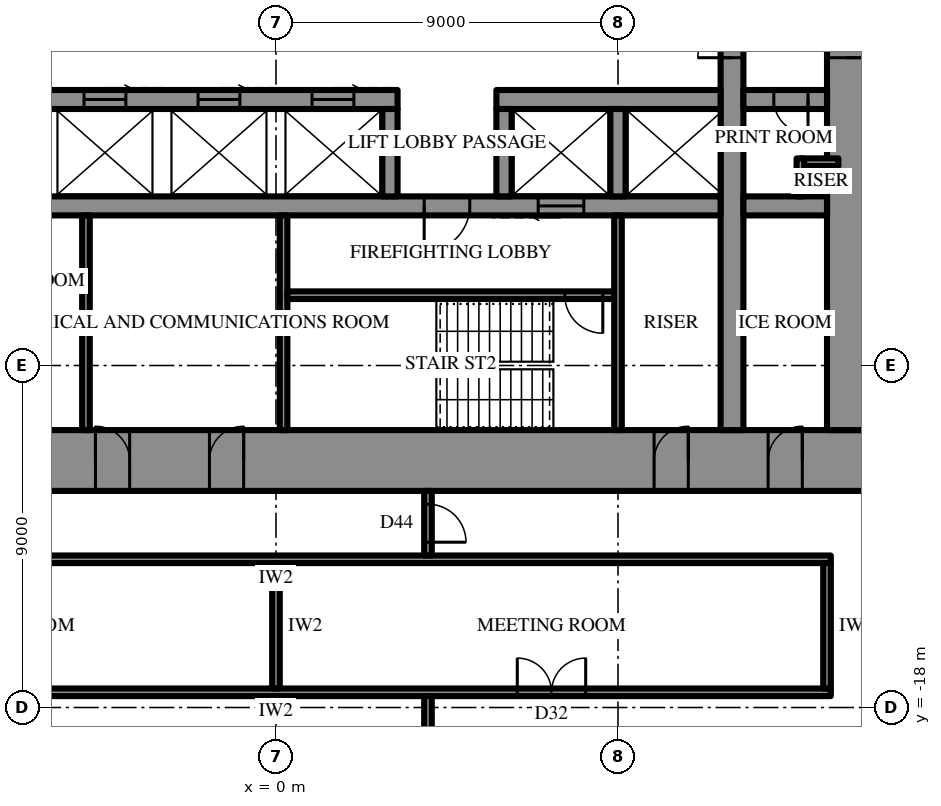
"""IFC4 building model, lengths in metres.
Left out: names, types, materials, properties, quantities, classifications, styles, units other than length and angle.
Written with IfcOpenShell. Run it as: python <this file> out.ifc"""

import sys

from ifc_helpers import new_model, si_unit, direction, frame, frame_2d, origin, place, context, subcontext, project, spatial, rectangle, extrude, element, fill, save


model = new_model("IFC4")
c1 = context("Model", 3, precision=1e-05, world=origin(), true_north=direction((0.0, 1.0)))
c2 = subcontext(c1, "Body", "Model", "MODEL_VIEW")
j1 = project(units=[si_unit("LENGTHUNIT", "METRE"), si_unit("PLANEANGLEUNIT", "RADIAN")], contexts=[c1])
p1 = place(None, origin())
s1 = spatial("IfcSite", under=j1, at=p1, CompositionType="ELEMENT")
p2 = place(p1, origin())
s2 = spatial("IfcBuilding", under=s1, at=p2, CompositionType="ELEMENT")
p3 = place(p2, frame((0.0, 0.0, 286.9)))
s3 = spatial("IfcBuildingStorey", under=s2, at=p3, CompositionType="ELEMENT", Elevation=286.9)
p4 = place(p3, frame((15.5, -11.5, 0.0), z_axis=(0.0, 0.0, 1.0), x_axis=(-1.0, 0.0, 0.0)))
e1 = element("IfcWall", 1, at=p4, inside=s3, PredefinedType="SHEAR", context=c2, shape_type="SweptSolid", body=[
    extrude(rectangle(XDim=31.0, YDim=1.6, at=frame_2d((15.5, 0.0))), origin(), (0.0, 0.0, 1.0), 4.2),
])
p5 = place(p4, frame((16.35, 0.0, 0.0)))
e2 = element("IfcOpeningElement", 2, at=p5, cuts=e1, PredefinedType="OPENING", context=c2, shape_type="SweptSolid", body=[
    extrude(rectangle(XDim=0.9, YDim=2.2, at=frame_2d((0.45, 1.1))), frame((0.0, 0.81, 0.0), z_axis=(0.0, -1.0, 0.0), x_axis=(1.0, 0.0, 0.0)), (0.0, 0.0, 1.0), 1.62),
])
p6 = place(p4, frame((19.35, 0.0, 0.0)))
e3 = element("IfcOpeningElement", 3, at=p6, cuts=e1, PredefinedType="OPENING", context=c2, shape_type="SweptSolid", body=[
    extrude(rectangle(XDim=0.9, YDim=2.2, at=frame_2d((0.45, 1.1))), frame((0.0, 0.81, 0.0), z_axis=(0.0, -1.0, 0.0), x_axis=(1.0, 0.0, 0.0)), (0.0, 0.0, 1.0), 1.62),
])
p7 = place(p4, frame((22.4, 0.0, 0.0)))
e4 = element("IfcOpeningElement", 4, at=p7, cuts=e1, PredefinedType="OPENING", context=c2, shape_type="SweptSolid", body=[
    extrude(rectangle(XDim=1.0, YDim=2.2, at=frame_2d((0.5, 1.1))), frame((0.0, 0.81, 0.0), z_axis=(0.0, -1.0, 0.0), x_axis=(1.0, 0.0, 0.0)), (0.0, 0.0, 1.0), 1.62),
])
p8 = place(p4, frame((1.65, 0.0, 0.0)))
e5 = element("IfcOpeningElement", 5, at=p8, cuts=e1, PredefinedType="OPENING", context=c2, shape_type="SweptSolid", body=[
    extrude(rectangle(XDim=0.9, YDim=2.2, at=frame_2d((0.45, 1.1))), frame((0.0, 0.81, 0.0), z_axis=(0.0, -1.0, 0.0), x_axis=(1.0, 0.0, 0.0)), (0.0, 0.0, 1.0), 1.62),
])
p9 = place(p4, frame((4.65, 0.0, 0.0)))
e6 = element("IfcOpeningElement", 6, at=p9, cuts=e1, PredefinedType="OPENING", context=c2, shape_type="SweptSolid", body=[
    extrude(rectangle(XDim=0.9, YDim=2.2, at=frame_2d((0.45, 1.1))), frame((0.0, 0.81, 0.0), z_axis=(0.0, -1.0, 0.0), x_axis=(1.0, 0.0, 0.0)), (0.0, 0.0, 1.0), 1.62),
])
p10 = place(p4, frame((25.45, 0.0, 0.0)))
e7 = element("IfcOpeningElement", 7, at=p10, cuts=e1, PredefinedType="OPENING", context=c2, shape_type="SweptSolid", body=[
    extrude(rectangle(XDim=0.9, YDim=2.2, at=frame_2d((0.45, 1.1))), frame((0.0, 0.81, 0.0), z_axis=(0.0, -1.0, 0.0), x_axis=(1.0, 0.0, 0.0)), (0.0, 0.0, 1.0), 1.62),
])
p11 = place(p4, frame((28.45, 0.0, 0.0)))
e8 = element("IfcOpeningElement", 8, at=p11, cuts=e1, PredefinedType="OPENING", context=c2, shape_type="SweptSolid", body=[
    extrude(rectangle(XDim=0.9, YDim=2.2, at=frame_2d((0.45, 1.1))), frame((0.0, 0.81, 0.0), z_axis=(0.0, -1.0, 0.0), x_axis=(1.0, 0.0, 0.0)), (0.0, 0.0, 1.0), 1.62),
])
p12 = place(p3, frame((15.0, -10.7, 0.0), z_axis=(0.0, 0.0, 1.0), x_axis=(0.0, 1.0, 0.0)))
e9 = element("IfcWall", 9, at=p12, inside=s3, PredefinedType="SHEAR", context=c2, shape_type="SweptSolid", body=[
    extrude(rectangle(XDim=21.4, YDim=1.0, at=frame_2d((10.7, 0.0))), origin(), (0.0, 0.0, 1.0), 4.2),
])
p13 = place(p12, frame((9.8, 0.0, 0.0)))
e10 = element("IfcOpeningElement", 10, at=p13, cuts=e9, PredefinedType="OPENING", context=c2, shape_type="SweptSolid", body=[
    extrude(rectangle(XDim=1.8, YDim=2.4, at=frame_2d((0.9, 1.2))), frame((0.0, 0.51, 0.0), z_axis=(0.0, -1.0, 0.0), x_axis=(1.0, 0.0, 0.0)), (0.0, 0.0, 1.0), 1.02),
])
p14 = place(p3, frame((12.0, -10.7, 0.0), z_axis=(0.0, 0.0, 1.0), x_axis=(0.0, 1.0, 0.0)))
e11 = element("IfcWall", 11, at=p14, inside=s3, PredefinedType="SHEAR", context=c2, shape_type="SweptSolid", body=[
    extrude(rectangle(XDim=21.4, YDim=0.6, at=frame_2d((10.7, 0.0))), origin(), (0.0, 0.0, 1.0), 4.2),
])
p15 = place(p14, frame((9.8, 0.0, 0.0)))
e12 = element("IfcOpeningElement", 12, at=p15, cuts=e11, PredefinedType="OPENING", context=c2, shape_type="SweptSolid", body=[
    extrude(rectangle(XDim=1.8, YDim=2.4, at=frame_2d((0.9, 1.2))), frame((0.0, 0.31, 0.0), z_axis=(0.0, -1.0, 0.0), x_axis=(1.0, 0.0, 0.0)), (0.0, 0.0, 1.0), 0.62),
])
p16 = place(p3, frame((14.5, -2.0, 0.0), z_axis=(0.0, 0.0, 1.0), x_axis=(-1.0, 0.0, 0.0)))
e13 = element("IfcWall", 13, at=p16, inside=s3, PredefinedType="SHEAR", context=c2, shape_type="SweptSolid", body=[
    extrude(rectangle(XDim=2.2, YDim=0.5, at=frame_2d((1.1, 0.0))), origin(), (0.0, 0.0, 1.0), 4.2),
])
p17 = place(p16, frame((0.5, 0.0, 0.0)))
e14 = element("IfcOpeningElement", 14, at=p17, cuts=e13, PredefinedType="OPENING", context=c2, shape_type="SweptSolid", body=[
    extrude(rectangle(XDim=0.9, YDim=2.2, at=frame_2d((0.45, 1.1))), frame((0.0, 0.26, 0.0), z_axis=(0.0, -1.0, 0.0), x_axis=(1.0, 0.0, 0.0)), (0.0, 0.0, 1.0), 0.52),
])
p18 = place(p3, frame((11.7, -2.0, 0.0), z_axis=(0.0, 0.0, 1.0), x_axis=(-1.0, 0.0, 0.0)))
e15 = element("IfcWall", 15, at=p18, inside=s3, PredefinedType="SHEAR", context=c2, shape_type="SweptSolid", body=[
    extrude(rectangle(XDim=5.9, YDim=0.5, at=frame_2d((2.95, 0.0))), origin(), (0.0, 0.0, 1.0), 4.2),
])
p19 = place(p3, frame((3.2, -2.0, 0.0), z_axis=(0.0, 0.0, 1.0), x_axis=(-1.0, 0.0, 0.0)))
e16 = element("IfcWall", 16, at=p19, inside=s3, PredefinedType="SHEAR", context=c2, shape_type="SweptSolid", body=[
    extrude(rectangle(XDim=14.9, YDim=0.5, at=frame_2d((7.45, 0.0))), origin(), (0.0, 0.0, 1.0), 4.2),
])
p20 = place(p19, frame((1.15, 0.0, 0.0)))
e17 = element("IfcOpeningElement", 17, at=p20, cuts=e16, PredefinedType="OPENING", context=c2, shape_type="SweptSolid", body=[
    extrude(rectangle(XDim=1.1, YDim=2.2, at=frame_2d((0.55, 1.1))), frame((0.0, 0.26, 0.0), z_axis=(0.0, -1.0, 0.0), x_axis=(1.0, 0.0, 0.0)), (0.0, 0.0, 1.0), 0.52),
])
p21 = place(p19, frame((4.15, 0.0, 0.0)))
e18 = element("IfcOpeningElement", 18, at=p21, cuts=e16, PredefinedType="OPENING", context=c2, shape_type="SweptSolid", body=[
    extrude(rectangle(XDim=1.1, YDim=2.2, at=frame_2d((0.55, 1.1))), frame((0.0, 0.26, 0.0), z_axis=(0.0, -1.0, 0.0), x_axis=(1.0, 0.0, 0.0)), (0.0, 0.0, 1.0), 0.52),
])
p22 = place(p19, frame((7.15, 0.0, 0.0)))
e19 = element("IfcOpeningElement", 19, at=p22, cuts=e16, PredefinedType="OPENING", context=c2, shape_type="SweptSolid", body=[
    extrude(rectangle(XDim=1.1, YDim=2.2, at=frame_2d((0.55, 1.1))), frame((0.0, 0.26, 0.0), z_axis=(0.0, -1.0, 0.0), x_axis=(1.0, 0.0, 0.0)), (0.0, 0.0, 1.0), 0.52),
])
p23 = place(p19, frame((10.15, 0.0, 0.0)))
e20 = element("IfcOpeningElement", 20, at=p23, cuts=e16, PredefinedType="OPENING", context=c2, shape_type="SweptSolid", body=[
    extrude(rectangle(XDim=1.1, YDim=2.2, at=frame_2d((0.55, 1.1))), frame((0.0, 0.26, 0.0), z_axis=(0.0, -1.0, 0.0), x_axis=(1.0, 0.0, 0.0)), (0.0, 0.0, 1.0), 0.52),
])
p24 = place(p3, frame((14.5, -4.8, 0.0), z_axis=(0.0, 0.0, 1.0), x_axis=(-1.0, 0.0, 0.0)))
e21 = element("IfcWall", 21, at=p24, inside=s3, PredefinedType="SHEAR", context=c2, shape_type="SweptSolid", body=[
    extrude(rectangle(XDim=2.2, YDim=0.5, at=frame_2d((1.1, 0.0))), origin(), (0.0, 0.0, 1.0), 4.2),
])
p25 = place(p3, frame((11.7, -4.8, 0.0), z_axis=(0.0, 0.0, 1.0), x_axis=(-1.0, 0.0, 0.0)))
e22 = element("IfcWall", 22, at=p25, inside=s3, PredefinedType="SHEAR", context=c2, shape_type="SweptSolid", body=[
    extrude(rectangle(XDim=23.4, YDim=0.5, at=frame_2d((11.7, 0.0))), origin(), (0.0, 0.0, 1.0), 4.2),
])
p26 = place(p25, frame((6.6, 0.0, 0.0)))
e23 = element("IfcOpeningElement", 23, at=p26, cuts=e22, PredefinedType="OPENING", context=c2, shape_type="SweptSolid", body=[
    extrude(rectangle(XDim=1.2, YDim=2.2, at=frame_2d((0.6, 1.1))), frame((0.0, 0.26, 0.0), z_axis=(0.0, -1.0, 0.0), x_axis=(1.0, 0.0, 0.0)), (0.0, 0.0, 1.0), 0.52),
])
p27 = place(p25, frame((3.6, 0.0, 0.0)))
e24 = element("IfcOpeningElement", 24, at=p27, cuts=e22, PredefinedType="OPENING", context=c2, shape_type="SweptSolid", body=[
    extrude(rectangle(XDim=1.2, YDim=2.2, at=frame_2d((0.6, 1.1))), frame((0.0, 0.26, 0.0), z_axis=(0.0, -1.0, 0.0), x_axis=(1.0, 0.0, 0.0)), (0.0, 0.0, 1.0), 0.52),
])
for number, where, z_axis, x_axis in (
    (25, (9.0, -2.25, 0.0), (0.0, 0.0, 1.0), (0.0, -1.0, 0.0)),
    (26, (6.0, -2.25, 0.0), (0.0, 0.0, 1.0), (0.0, -1.0, 0.0)),
    (27, (3.0, -2.25, 0.0), (0.0, 0.0, 1.0), (0.0, -1.0, 0.0)),
):
    element("IfcWall", number, at=place(p3, frame(where, z_axis=z_axis, x_axis=x_axis)), inside=s3, PredefinedType="SHEAR", context=c2, shape_type="SweptSolid", body=[
        extrude(rectangle(XDim=2.3, YDim=0.4, at=frame_2d((1.15, 0.0))), origin(), (0.0, 0.0, 1.0), 4.2),
    ])
p28 = place(p3, frame((0.2, -5.05, 0.0), z_axis=(0.0, 0.0, 1.0), x_axis=(0.0, -1.0, 0.0)))
e28 = element("IfcWall", 28, at=p28, inside=s3, PredefinedType="SHEAR", context=c2, shape_type="SweptSolid", body=[
    extrude(rectangle(XDim=5.65, YDim=0.2, at=frame_2d((2.825, 0.0))), origin(), (0.0, 0.0, 1.0), 4.2),
])
p29 = place(p3, frame((8.9, -7.15, 0.0), z_axis=(0.0, 0.0, 1.0), x_axis=(-1.0, 0.0, 0.0)))
e29 = element("IfcWall", 29, at=p29, inside=s3, PredefinedType="SHEAR", context=c2, shape_type="SweptSolid", body=[
    extrude(rectangle(XDim=8.6, YDim=0.2, at=frame_2d((4.3, 0.0))), origin(), (0.0, 0.0, 1.0), 4.2),
])
p30 = place(p29, frame((0.3, 0.0, 0.0)))
e30 = element("IfcOpeningElement", 30, at=p30, cuts=e29, PredefinedType="OPENING", context=c2, shape_type="SweptSolid", body=[
    extrude(rectangle(XDim=1.0, YDim=2.2, at=frame_2d((0.5, 1.1))), frame((0.0, 0.11, 0.0), z_axis=(0.0, -1.0, 0.0), x_axis=(1.0, 0.0, 0.0)), (0.0, 0.0, 1.0), 0.22),
])
for number, where, z_axis, x_axis in (
    (31, (9.0, -5.05, 0.0), (0.0, 0.0, 1.0), (0.0, -1.0, 0.0)),
    (32, (-5.0, -5.05, 0.0), (0.0, 0.0, 1.0), (0.0, -1.0, 0.0)),
):
    element("IfcWall", number, at=place(p3, frame(where, z_axis=z_axis, x_axis=x_axis)), inside=s3, PredefinedType="PARTITIONING", context=c2, shape_type="SweptSolid", body=[
        extrude(rectangle(XDim=5.65, YDim=0.2, at=frame_2d((2.825, 0.0))), origin(), (0.0, 0.0, 1.0), 4.0),
    ])
for number, where, z_axis, x_axis in (
    (33, (14.8, -3.65, 0.0), (0.0, 0.0, 1.0), (-1.0, 0.0, 0.0)),
    (34, (13.8, -3.55, 0.0), (0.0, 0.0, 1.0), (0.0, -1.0, 0.0)),
):
    element("IfcWall", number, at=place(p3, frame(where, z_axis=z_axis, x_axis=x_axis)), inside=s3, PredefinedType="PARTITIONING", context=c2, shape_type="SweptSolid", body=[
        extrude(rectangle(XDim=1.0, YDim=0.2, at=frame_2d((0.5, 0.0))), origin(), (0.0, 0.0, 1.0), 4.0),
    ])
p31 = place(p3, frame((14.6, -14.1, 0.0), z_axis=(0.0, 0.0, 1.0), x_axis=(-1.0, 0.0, 0.0)))
e35 = element("IfcWall", 35, at=p31, inside=s3, PredefinedType="PARTITIONING", context=c2, shape_type="SweptSolid", body=[
    extrude(rectangle(XDim=29.2, YDim=0.2, at=frame_2d((14.6, 0.0))), origin(), (0.0, 0.0, 1.0), 4.0),
])
p32 = place(p3, frame((14.6, -17.6, 0.0), z_axis=(0.0, 0.0, 1.0), x_axis=(-1.0, 0.0, 0.0)))
e36 = element("IfcWall", 36, at=p32, inside=s3, PredefinedType="PARTITIONING", context=c2, shape_type="SweptSolid", body=[
    extrude(rectangle(XDim=29.2, YDim=0.2, at=frame_2d((14.6, 0.0))), origin(), (0.0, 0.0, 1.0), 4.0),
])
p33 = place(p32, frame((6.45, 0.0, 0.0)))
e37 = element("IfcOpeningElement", 37, at=p33, cuts=e36, PredefinedType="OPENING", context=c2, shape_type="SweptSolid", body=[
    extrude(rectangle(XDim=1.8, YDim=2.4, at=frame_2d((0.9, 1.2))), frame((0.0, 0.11, 0.0), z_axis=(0.0, -1.0, 0.0), x_axis=(1.0, 0.0, 0.0)), (0.0, 0.0, 1.0), 0.22),
])
p34 = place(p32, frame((20.95, 0.0, 0.0)))
e38 = element("IfcOpeningElement", 38, at=p34, cuts=e36, PredefinedType="OPENING", context=c2, shape_type="SweptSolid", body=[
    extrude(rectangle(XDim=1.8, YDim=2.4, at=frame_2d((0.9, 1.2))), frame((0.0, 0.11, 0.0), z_axis=(0.0, -1.0, 0.0), x_axis=(1.0, 0.0, 0.0)), (0.0, 0.0, 1.0), 0.22),
])
p35 = place(p3, frame((14.5, -14.2, 0.0), z_axis=(0.0, 0.0, 1.0), x_axis=(0.0, -1.0, 0.0)))
e39 = element("IfcWall", 39, at=p35, inside=s3, PredefinedType="PARTITIONING", context=c2, shape_type="SweptSolid", body=[
    extrude(rectangle(XDim=3.3, YDim=0.2, at=frame_2d((1.65, 0.0))), origin(), (0.0, 0.0, 1.0), 4.0),
])
p36 = place(p3, frame((0.0, -14.2, 0.0), z_axis=(0.0, 0.0, 1.0), x_axis=(0.0, -1.0, 0.0)))
e40 = element("IfcWall", 40, at=p36, inside=s3, PredefinedType="PARTITIONING", context=c2, shape_type="SweptSolid", body=[
    extrude(rectangle(XDim=3.3, YDim=0.2, at=frame_2d((1.65, 0.0))), origin(), (0.0, 0.0, 1.0), 2.992),
])
p37 = place(p3, frame((4.0, -12.3, 0.0), z_axis=(0.0, 0.0, 1.0), x_axis=(0.0, -1.0, 0.0)))
e41 = element("IfcWall", 41, at=p37, inside=s3, PredefinedType="PARTITIONING", context=c2, shape_type="SweptSolid", body=[
    extrude(rectangle(XDim=1.7, YDim=0.2, at=frame_2d((0.85, 0.0))), origin(), (0.0, 0.0, 1.0), 4.0),
])
p38 = place(p37, frame((0.35, 0.0, 0.0)))
e42 = element("IfcOpeningElement", 42, at=p38, cuts=e41, PredefinedType="OPENING", context=c2, shape_type="SweptSolid", body=[
    extrude(rectangle(XDim=1.0, YDim=2.2, at=frame_2d((0.5, 1.1))), frame((0.0, 0.11, 0.0), z_axis=(0.0, -1.0, 0.0), x_axis=(1.0, 0.0, 0.0)), (0.0, 0.0, 1.0), 0.22),
])
p39 = place(p3, frame((4.0, -17.7, 0.0), z_axis=(0.0, 0.0, 1.0), x_axis=(0.0, -1.0, 0.0)))
e43 = element("IfcWall", 43, at=p39, inside=s3, PredefinedType="PARTITIONING", context=c2, shape_type="SweptSolid", body=[
    extrude(rectangle(XDim=11.1, YDim=0.2, at=frame_2d((5.55, 0.0))), origin(), (0.0, 0.0, 1.0), 4.0),
])
p40 = place(p13, frame((1.8, 0.0, 0.0), z_axis=(0.0, 0.0, 1.0), x_axis=(-1.0, 0.0, 0.0)))
e44 = element("IfcDoor", 44, at=p40, inside=s3, OperationType="DOUBLE_DOOR_SINGLE_SWING", PredefinedType="DOOR", context=c2, shape_type="SweptSolid", body=[
    extrude(rectangle(XDim=1.8, YDim=2.4, at=frame_2d((0.9, 1.2))), frame((0.0, 0.025, 0.0), z_axis=(0.0, -1.0, 0.0), x_axis=(1.0, 0.0, 0.0)), (0.0, 0.0, 1.0), 0.05),
])
fill(e10, e44)
p41 = place(p26, origin())
e45 = element("IfcDoor", 45, at=p41, inside=s3, OperationType="SINGLE_SWING_LEFT", PredefinedType="DOOR", context=c2, shape_type="SweptSolid", body=[
    extrude(rectangle(XDim=1.2, YDim=2.2, at=frame_2d((0.6, 1.1))), frame((0.0, 0.025, 0.0), z_axis=(0.0, -1.0, 0.0), x_axis=(1.0, 0.0, 0.0)), (0.0, 0.0, 1.0), 0.05),
])
fill(e23, e45)
p42 = place(p30, origin())
e46 = element("IfcDoor", 46, at=p42, inside=s3, OperationType="SINGLE_SWING_RIGHT", PredefinedType="DOOR", context=c2, shape_type="SweptSolid", body=[
    extrude(rectangle(XDim=1.0, YDim=2.2, at=frame_2d((0.5, 1.1))), frame((0.0, 0.025, 0.0), z_axis=(0.0, -1.0, 0.0), x_axis=(1.0, 0.0, 0.0)), (0.0, 0.0, 1.0), 0.05),
])
fill(e30, e46)
p43 = place(p5, frame((0.9, 0.0, 0.0), z_axis=(0.0, 0.0, 1.0), x_axis=(-1.0, 0.0, 0.0)))
e47 = element("IfcDoor", 47, at=p43, inside=s3, OperationType="SINGLE_SWING_LEFT", PredefinedType="DOOR", context=c2, shape_type="SweptSolid", body=[
    extrude(rectangle(XDim=0.9, YDim=2.2, at=frame_2d((0.45, 1.1))), frame((0.0, 0.025, 0.0), z_axis=(0.0, -1.0, 0.0), x_axis=(1.0, 0.0, 0.0)), (0.0, 0.0, 1.0), 0.05),
])
fill(e2, e47)
p44 = place(p6, frame((0.9, 0.0, 0.0), z_axis=(0.0, 0.0, 1.0), x_axis=(-1.0, 0.0, 0.0)))
e48 = element("IfcDoor", 48, at=p44, inside=s3, OperationType="SINGLE_SWING_RIGHT", PredefinedType="DOOR", context=c2, shape_type="SweptSolid", body=[
    extrude(rectangle(XDim=0.9, YDim=2.2, at=frame_2d((0.45, 1.1))), frame((0.0, 0.025, 0.0), z_axis=(0.0, -1.0, 0.0), x_axis=(1.0, 0.0, 0.0)), (0.0, 0.0, 1.0), 0.05),
])
fill(e3, e48)
p45 = place(p8, frame((0.9, 0.0, 0.0), z_axis=(0.0, 0.0, 1.0), x_axis=(-1.0, 0.0, 0.0)))
e49 = element("IfcDoor", 49, at=p45, inside=s3, OperationType="SINGLE_SWING_LEFT", PredefinedType="DOOR", context=c2, shape_type="SweptSolid", body=[
    extrude(rectangle(XDim=0.9, YDim=2.2, at=frame_2d((0.45, 1.1))), frame((0.0, 0.025, 0.0), z_axis=(0.0, -1.0, 0.0), x_axis=(1.0, 0.0, 0.0)), (0.0, 0.0, 1.0), 0.05),
])
fill(e5, e49)
p46 = place(p9, frame((0.9, 0.0, 0.0), z_axis=(0.0, 0.0, 1.0), x_axis=(-1.0, 0.0, 0.0)))
e50 = element("IfcDoor", 50, at=p46, inside=s3, OperationType="SINGLE_SWING_LEFT", PredefinedType="DOOR", context=c2, shape_type="SweptSolid", body=[
    extrude(rectangle(XDim=0.9, YDim=2.2, at=frame_2d((0.45, 1.1))), frame((0.0, 0.025, 0.0), z_axis=(0.0, -1.0, 0.0), x_axis=(1.0, 0.0, 0.0)), (0.0, 0.0, 1.0), 0.05),
])
fill(e6, e50)
p47 = place(p17, origin())
e51 = element("IfcDoor", 51, at=p47, inside=s3, OperationType="SINGLE_SWING_RIGHT", PredefinedType="DOOR", context=c2, shape_type="SweptSolid", body=[
    extrude(rectangle(XDim=0.9, YDim=2.2, at=frame_2d((0.45, 1.1))), frame((0.0, 0.025, 0.0), z_axis=(0.0, -1.0, 0.0), x_axis=(1.0, 0.0, 0.0)), (0.0, 0.0, 1.0), 0.05),
])
fill(e14, e51)
p48 = place(p15, origin())
e52 = element("IfcDoor", 52, at=p48, inside=s3, OperationType="DOUBLE_DOOR_SINGLE_SWING", PredefinedType="DOOR", context=c2, shape_type="SweptSolid", body=[
    extrude(rectangle(XDim=1.8, YDim=2.4, at=frame_2d((0.9, 1.2))), frame((0.0, 0.025, 0.0), z_axis=(0.0, -1.0, 0.0), x_axis=(1.0, 0.0, 0.0)), (0.0, 0.0, 1.0), 0.05),
])
fill(e12, e52)
p49 = place(p27, origin())
e53 = element("IfcDoor", 53, at=p49, inside=s3, OperationType="SLIDING_TO_LEFT", PredefinedType="DOOR", context=c2, shape_type="SweptSolid", body=[
    extrude(rectangle(XDim=1.2, YDim=2.2, at=frame_2d((0.6, 1.1))), frame((0.0, 0.025, 0.0), z_axis=(0.0, -1.0, 0.0), x_axis=(1.0, 0.0, 0.0)), (0.0, 0.0, 1.0), 0.05),
])
fill(e24, e53)
p50 = place(p20, frame((1.1, 0.0, 0.0), z_axis=(0.0, 0.0, 1.0), x_axis=(-1.0, 0.0, 0.0)))
e54 = element("IfcDoor", 54, at=p50, inside=s3, OperationType="SLIDING_TO_LEFT", PredefinedType="DOOR", context=c2, shape_type="SweptSolid", body=[
    extrude(rectangle(XDim=1.1, YDim=2.2, at=frame_2d((0.55, 1.1))), frame((0.0, 0.025, 0.0), z_axis=(0.0, -1.0, 0.0), x_axis=(1.0, 0.0, 0.0)), (0.0, 0.0, 1.0), 0.05),
])
fill(e17, e54)
p51 = place(p21, frame((1.1, 0.0, 0.0), z_axis=(0.0, 0.0, 1.0), x_axis=(-1.0, 0.0, 0.0)))
e55 = element("IfcDoor", 55, at=p51, inside=s3, OperationType="SLIDING_TO_LEFT", PredefinedType="DOOR", context=c2, shape_type="SweptSolid", body=[
    extrude(rectangle(XDim=1.1, YDim=2.2, at=frame_2d((0.55, 1.1))), frame((0.0, 0.025, 0.0), z_axis=(0.0, -1.0, 0.0), x_axis=(1.0, 0.0, 0.0)), (0.0, 0.0, 1.0), 0.05),
])
fill(e18, e55)
p52 = place(p22, frame((1.1, 0.0, 0.0), z_axis=(0.0, 0.0, 1.0), x_axis=(-1.0, 0.0, 0.0)))
e56 = element("IfcDoor", 56, at=p52, inside=s3, OperationType="SLIDING_TO_LEFT", PredefinedType="DOOR", context=c2, shape_type="SweptSolid", body=[
    extrude(rectangle(XDim=1.1, YDim=2.2, at=frame_2d((0.55, 1.1))), frame((0.0, 0.025, 0.0), z_axis=(0.0, -1.0, 0.0), x_axis=(1.0, 0.0, 0.0)), (0.0, 0.0, 1.0), 0.05),
])
fill(e19, e56)
p53 = place(p33, frame((1.8, 0.0, 0.0), z_axis=(0.0, 0.0, 1.0), x_axis=(-1.0, 0.0, 0.0)))
e57 = element("IfcDoor", 57, at=p53, inside=s3, OperationType="DOUBLE_DOOR_SINGLE_SWING", PredefinedType="DOOR", context=c2, shape_type="SweptSolid", body=[
    extrude(rectangle(XDim=1.8, YDim=2.4, at=frame_2d((0.9, 1.2))), frame((0.0, 0.025, 0.0), z_axis=(0.0, -1.0, 0.0), x_axis=(1.0, 0.0, 0.0)), (0.0, 0.0, 1.0), 0.05),
])
fill(e37, e57)
p54 = place(p38, origin())
e58 = element("IfcDoor", 58, at=p54, inside=s3, OperationType="SINGLE_SWING_LEFT", PredefinedType="DOOR", context=c2, shape_type="SweptSolid", body=[
    extrude(rectangle(XDim=1.0, YDim=2.2, at=frame_2d((0.5, 1.1))), frame((0.0, 0.025, 0.0), z_axis=(0.0, -1.0, 0.0), x_axis=(1.0, 0.0, 0.0)), (0.0, 0.0, 1.0), 0.05),
])
fill(e42, e58)
save(model, sys.argv[1])
